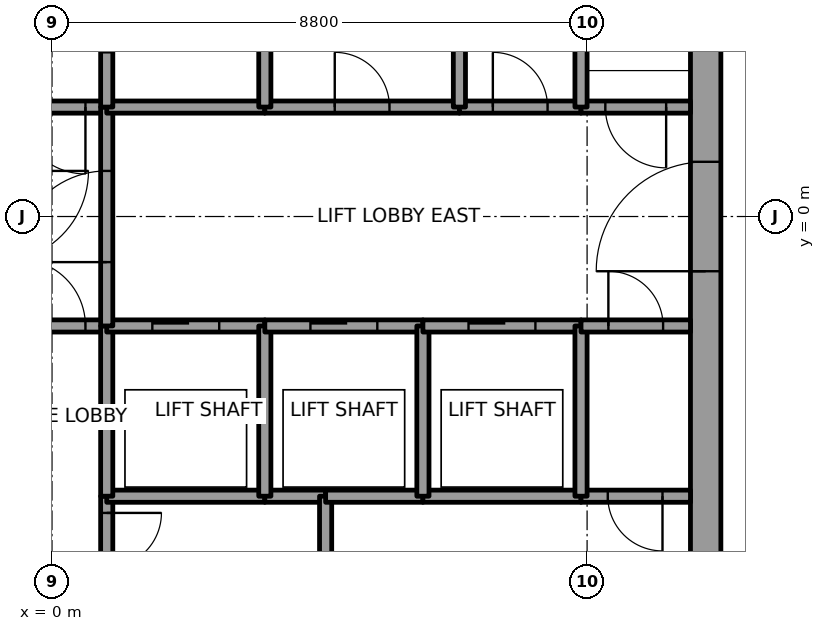
"""IFC4 building model, lengths in metres.
Left out: names, types, materials, properties, quantities, classifications, styles, units other than length and angle.
Written with IfcOpenShell. Run it as: python <this file> out.ifc"""

import sys

from ifc_helpers import new_model, si_unit, direction, frame, frame_2d, origin, place, context, subcontext, project, spatial, rectangle, extrude, element, fill, save


model = new_model("IFC4")
c1 = context("Model", 3, precision=1e-05, world=origin(), true_north=direction((0.0, 1.0)))
c2 = subcontext(c1, "Body", "Model", "MODEL_VIEW")
j1 = project(units=[si_unit("LENGTHUNIT", "METRE"), si_unit("PLANEANGLEUNIT", "RADIAN")], contexts=[c1])
p1 = place(None, origin())
s1 = spatial("IfcSite", under=j1, at=p1, CompositionType="ELEMENT")
p2 = place(p1, origin())
s2 = spatial("IfcBuilding", under=s1, at=p2, CompositionType="ELEMENT")
p3 = place(p2, frame((0.0, 0.0, 255.0)))
s3 = spatial("IfcBuildingStorey", under=s2, at=p3, CompositionType="ELEMENT", Elevation=255.0)
p4 = place(p3, frame((10.75, -7.5, 0.0), z_axis=(0.0, 0.0, 1.0), x_axis=(0.0, 1.0, 0.0)))
e1 = element("IfcWall", 1, at=p4, inside=s3, PredefinedType="SHEAR", context=c2, shape_type="SweptSolid", body=[
    extrude(rectangle(XDim=15.0, YDim=0.5, at=frame_2d((7.5, 0.0))), origin(), (0.0, 0.0, 1.0), 4.0),
])
p5 = place(p4, frame((6.6, 0.0, 0.0)))
e2 = element("IfcOpeningElement", 2, at=p5, cuts=e1, PredefinedType="OPENING", context=c2, shape_type="SweptSolid", body=[
    extrude(rectangle(XDim=1.8, YDim=2.1, at=frame_2d((0.9, 1.05))), frame((0.0, 0.25, 0.0), z_axis=(0.0, -1.0, 0.0), x_axis=(1.0, 0.0, 0.0)), (0.0, 0.0, 1.0), 0.5),
])
p6 = place(p3, frame((-0.9, -1.8, 0.0), z_axis=(0.0, 0.0, 1.0), x_axis=(1.0, 0.0, 0.0)))
e3 = element("IfcWall", 3, at=p6, inside=s3, PredefinedType="SOLIDWALL", context=c2, shape_type="SweptSolid", body=[
    extrude(rectangle(XDim=1.8, YDim=0.2, at=frame_2d((0.9, 0.0))), origin(), (0.0, 0.0, 1.0), 3.85),
])
p7 = place(p6, frame((0.35, 0.0, 0.0)))
e4 = element("IfcOpeningElement", 4, at=p7, cuts=e3, PredefinedType="OPENING", context=c2, shape_type="SweptSolid", body=[
    extrude(rectangle(XDim=1.1, YDim=2.1, at=frame_2d((0.55, 1.05))), frame((0.0, 0.1, 0.0), z_axis=(0.0, -1.0, 0.0), x_axis=(1.0, 0.0, 0.0)), (0.0, 0.0, 1.0), 0.2),
])
p8 = place(p3, frame((0.9, 1.8, 0.0), z_axis=(0.0, 0.0, 1.0), x_axis=(-1.0, 0.0, 0.0)))
e5 = element("IfcWall", 5, at=p8, inside=s3, PredefinedType="SOLIDWALL", context=c2, shape_type="SweptSolid", body=[
    extrude(rectangle(XDim=1.8, YDim=0.2, at=frame_2d((0.9, 0.0))), origin(), (0.0, 0.0, 1.0), 3.85),
])
p9 = place(p8, frame((0.35, 0.0, 0.0)))
e6 = element("IfcOpeningElement", 6, at=p9, cuts=e5, PredefinedType="OPENING", context=c2, shape_type="SweptSolid", body=[
    extrude(rectangle(XDim=1.1, YDim=2.1, at=frame_2d((0.55, 1.05))), frame((0.0, 0.1, 0.0), z_axis=(0.0, -1.0, 0.0), x_axis=(1.0, 0.0, 0.0)), (0.0, 0.0, 1.0), 0.2),
])
p10 = place(p3, frame((0.9, -4.6, 0.0), z_axis=(0.0, 0.0, 1.0), x_axis=(0.0, -1.0, 0.0)))
e7 = element("IfcWall", 7, at=p10, inside=s3, PredefinedType="SOLIDWALL", context=c2, shape_type="SweptSolid", body=[
    extrude(rectangle(XDim=1.45, YDim=0.2, at=frame_2d((0.725, 0.0))), origin(), (0.0, 0.0, 1.0), 3.85),
])
p11 = place(p10, frame((0.275, 0.0, 0.0)))
e8 = element("IfcOpeningElement", 8, at=p11, cuts=e7, PredefinedType="OPENING", context=c2, shape_type="SweptSolid", body=[
    extrude(rectangle(XDim=0.9, YDim=2.1, at=frame_2d((0.45, 1.05))), frame((0.0, 0.1, 0.0), z_axis=(0.0, -1.0, 0.0), x_axis=(1.0, 0.0, 0.0)), (0.0, 0.0, 1.0), 0.2),
])
p12 = place(p3, frame((3.5, -4.6, 0.0), z_axis=(0.0, 0.0, 1.0), x_axis=(-1.0, 0.0, 0.0)))
e9 = element("IfcWall", 9, at=p12, inside=s3, PredefinedType="SOLIDWALL", context=c2, shape_type="SweptSolid", body=[
    extrude(rectangle(XDim=2.6, YDim=0.2, at=frame_2d((1.3, 0.0))), origin(), (0.0, 0.0, 1.0), 3.85),
])
p13 = place(p3, frame((0.9, -1.8, 0.0), z_axis=(0.0, 0.0, 1.0), x_axis=(0.0, -1.0, 0.0)))
e10 = element("IfcWall", 10, at=p13, inside=s3, PredefinedType="SOLIDWALL", context=c2, shape_type="SweptSolid", body=[
    extrude(rectangle(XDim=2.8, YDim=0.2, at=frame_2d((1.4, 0.0))), origin(), (0.0, 0.0, 1.0), 3.85),
])
p14 = place(p3, frame((0.9, -1.8, 0.0), z_axis=(0.0, 0.0, 1.0), x_axis=(1.0, 0.0, 0.0)))
e11 = element("IfcWall", 11, at=p14, inside=s3, PredefinedType="SOLIDWALL", context=c2, shape_type="SweptSolid", body=[
    extrude(rectangle(XDim=2.6, YDim=0.2, at=frame_2d((1.3, 0.0))), origin(), (0.0, 0.0, 1.0), 3.85),
])
p15 = place(p14, frame((0.75, 0.0, 0.0)))
e12 = element("IfcOpeningElement", 12, at=p15, cuts=e11, PredefinedType="OPENING", context=c2, shape_type="SweptSolid", body=[
    extrude(rectangle(XDim=1.1, YDim=2.1, at=frame_2d((0.55, 1.05))), frame((0.0, 0.1, 0.0), z_axis=(0.0, -1.0, 0.0), x_axis=(1.0, 0.0, 0.0)), (0.0, 0.0, 1.0), 0.2),
])
p16 = place(p3, frame((0.9, -1.8, 0.0), z_axis=(0.0, 0.0, 1.0), x_axis=(0.0, 1.0, 0.0)))
e13 = element("IfcWall", 13, at=p16, inside=s3, PredefinedType="SOLIDWALL", context=c2, shape_type="SweptSolid", body=[
    extrude(rectangle(XDim=3.6, YDim=0.2, at=frame_2d((1.8, 0.0))), origin(), (0.0, 0.0, 1.0), 3.85),
])
p17 = place(p16, frame((1.05, 0.0, 0.0)))
e14 = element("IfcOpeningElement", 14, at=p17, cuts=e13, PredefinedType="OPENING", context=c2, shape_type="SweptSolid", body=[
    extrude(rectangle(XDim=1.5, YDim=2.1, at=frame_2d((0.75, 1.05))), frame((0.0, 0.1, 0.0), z_axis=(0.0, -1.0, 0.0), x_axis=(1.0, 0.0, 0.0)), (0.0, 0.0, 1.0), 0.2),
])
p18 = place(p3, frame((3.5, 1.8, 0.0), z_axis=(0.0, 0.0, 1.0), x_axis=(-1.0, 0.0, 0.0)))
e15 = element("IfcWall", 15, at=p18, inside=s3, PredefinedType="SOLIDWALL", context=c2, shape_type="SweptSolid", body=[
    extrude(rectangle(XDim=2.6, YDim=0.2, at=frame_2d((1.3, 0.0))), origin(), (0.0, 0.0, 1.0), 3.85),
])
p19 = place(p3, frame((0.9, 4.8, 0.0), z_axis=(0.0, 0.0, 1.0), x_axis=(0.0, -1.0, 0.0)))
e16 = element("IfcWall", 16, at=p19, inside=s3, PredefinedType="SOLIDWALL", context=c2, shape_type="SweptSolid", body=[
    extrude(rectangle(XDim=3.0, YDim=0.2, at=frame_2d((1.5, 0.0))), origin(), (0.0, 0.0, 1.0), 3.85),
])
p20 = place(p19, frame((0.9, 0.0, 0.0)))
e17 = element("IfcOpeningElement", 17, at=p20, cuts=e16, PredefinedType="OPENING", context=c2, shape_type="SweptSolid", body=[
    extrude(rectangle(XDim=1.2, YDim=2.1, at=frame_2d((0.6, 1.05))), frame((0.0, 0.1, 0.0), z_axis=(0.0, -1.0, 0.0), x_axis=(1.0, 0.0, 0.0)), (0.0, 0.0, 1.0), 0.2),
])
p21 = place(p3, frame((4.5, -4.6, 0.0), z_axis=(0.0, 0.0, 1.0), x_axis=(-1.0, 0.0, 0.0)))
e18 = element("IfcWall", 18, at=p21, inside=s3, PredefinedType="SOLIDWALL", context=c2, shape_type="SweptSolid", body=[
    extrude(rectangle(XDim=1.0, YDim=0.2, at=frame_2d((0.5, 0.0))), origin(), (0.0, 0.0, 1.0), 3.85),
])
p22 = place(p3, frame((3.5, -4.6, 0.0), z_axis=(0.0, 0.0, 1.0), x_axis=(0.0, 1.0, 0.0)))
e19 = element("IfcWall", 19, at=p22, inside=s3, PredefinedType="SOLIDWALL", context=c2, shape_type="SweptSolid", body=[
    extrude(rectangle(XDim=2.8, YDim=0.2, at=frame_2d((1.4, 0.0))), origin(), (0.0, 0.0, 1.0), 3.85),
])
p23 = place(p3, frame((3.5, -1.8, 0.0), z_axis=(0.0, 0.0, 1.0), x_axis=(1.0, 0.0, 0.0)))
e20 = element("IfcWall", 20, at=p23, inside=s3, PredefinedType="SOLIDWALL", context=c2, shape_type="SweptSolid", body=[
    extrude(rectangle(XDim=2.6, YDim=0.2, at=frame_2d((1.3, 0.0))), origin(), (0.0, 0.0, 1.0), 3.85),
])
p24 = place(p23, frame((0.75, 0.0, 0.0)))
e21 = element("IfcOpeningElement", 21, at=p24, cuts=e20, PredefinedType="OPENING", context=c2, shape_type="SweptSolid", body=[
    extrude(rectangle(XDim=1.1, YDim=2.1, at=frame_2d((0.55, 1.05))), frame((0.0, 0.1, 0.0), z_axis=(0.0, -1.0, 0.0), x_axis=(1.0, 0.0, 0.0)), (0.0, 0.0, 1.0), 0.2),
])
p25 = place(p3, frame((3.5, 1.8, 0.0), z_axis=(0.0, 0.0, 1.0), x_axis=(1.0, 0.0, 0.0)))
e22 = element("IfcWall", 22, at=p25, inside=s3, PredefinedType="SOLIDWALL", context=c2, shape_type="SweptSolid", body=[
    extrude(rectangle(XDim=3.2, YDim=0.2, at=frame_2d((1.6, 0.0))), origin(), (0.0, 0.0, 1.0), 3.85),
])
p26 = place(p25, frame((1.15, 0.0, 0.0)))
e23 = element("IfcOpeningElement", 23, at=p26, cuts=e22, PredefinedType="OPENING", context=c2, shape_type="SweptSolid", body=[
    extrude(rectangle(XDim=0.9, YDim=2.1, at=frame_2d((0.45, 1.05))), frame((0.0, 0.1, 0.0), z_axis=(0.0, -1.0, 0.0), x_axis=(1.0, 0.0, 0.0)), (0.0, 0.0, 1.0), 0.2),
])
p27 = place(p3, frame((3.5, 4.6, 0.0), z_axis=(0.0, 0.0, 1.0), x_axis=(0.0, -1.0, 0.0)))
e24 = element("IfcWall", 24, at=p27, inside=s3, PredefinedType="SOLIDWALL", context=c2, shape_type="SweptSolid", body=[
    extrude(rectangle(XDim=2.8, YDim=0.2, at=frame_2d((1.4, 0.0))), origin(), (0.0, 0.0, 1.0), 3.85),
])
p28 = place(p3, frame((4.5, -4.6, 0.0), z_axis=(0.0, 0.0, 1.0), x_axis=(0.0, -1.0, 0.0)))
e25 = element("IfcWall", 25, at=p28, inside=s3, PredefinedType="SOLIDWALL", context=c2, shape_type="SweptSolid", body=[
    extrude(rectangle(XDim=1.45, YDim=0.2, at=frame_2d((0.725, 0.0))), origin(), (0.0, 0.0, 1.0), 3.85),
])
p29 = place(p3, frame((6.1, -4.6, 0.0), z_axis=(0.0, 0.0, 1.0), x_axis=(-1.0, 0.0, 0.0)))
e26 = element("IfcWall", 26, at=p29, inside=s3, PredefinedType="SOLIDWALL", context=c2, shape_type="SweptSolid", body=[
    extrude(rectangle(XDim=1.6, YDim=0.2, at=frame_2d((0.8, 0.0))), origin(), (0.0, 0.0, 1.0), 3.85),
])
p30 = place(p3, frame((8.7, -4.6, 0.0), z_axis=(0.0, 0.0, 1.0), x_axis=(-1.0, 0.0, 0.0)))
e27 = element("IfcWall", 27, at=p30, inside=s3, PredefinedType="SOLIDWALL", context=c2, shape_type="SweptSolid", body=[
    extrude(rectangle(XDim=2.6, YDim=0.2, at=frame_2d((1.3, 0.0))), origin(), (0.0, 0.0, 1.0), 3.85),
])
p31 = place(p3, frame((6.1, -4.6, 0.0), z_axis=(0.0, 0.0, 1.0), x_axis=(0.0, 1.0, 0.0)))
e28 = element("IfcWall", 28, at=p31, inside=s3, PredefinedType="SOLIDWALL", context=c2, shape_type="SweptSolid", body=[
    extrude(rectangle(XDim=2.8, YDim=0.2, at=frame_2d((1.4, 0.0))), origin(), (0.0, 0.0, 1.0), 3.85),
])
p32 = place(p3, frame((6.1, -1.8, 0.0), z_axis=(0.0, 0.0, 1.0), x_axis=(1.0, 0.0, 0.0)))
e29 = element("IfcWall", 29, at=p32, inside=s3, PredefinedType="SOLIDWALL", context=c2, shape_type="SweptSolid", body=[
    extrude(rectangle(XDim=2.6, YDim=0.2, at=frame_2d((1.3, 0.0))), origin(), (0.0, 0.0, 1.0), 3.85),
])
p33 = place(p32, frame((0.75, 0.0, 0.0)))
e30 = element("IfcOpeningElement", 30, at=p33, cuts=e29, PredefinedType="OPENING", context=c2, shape_type="SweptSolid", body=[
    extrude(rectangle(XDim=1.1, YDim=2.1, at=frame_2d((0.55, 1.05))), frame((0.0, 0.1, 0.0), z_axis=(0.0, -1.0, 0.0), x_axis=(1.0, 0.0, 0.0)), (0.0, 0.0, 1.0), 0.2),
])
p34 = place(p3, frame((6.7, 1.8, 0.0), z_axis=(0.0, 0.0, 1.0), x_axis=(1.0, 0.0, 0.0)))
e31 = element("IfcWall", 31, at=p34, inside=s3, PredefinedType="SOLIDWALL", context=c2, shape_type="SweptSolid", body=[
    extrude(rectangle(XDim=2.0, YDim=0.2, at=frame_2d((1.0, 0.0))), origin(), (0.0, 0.0, 1.0), 3.85),
])
p35 = place(p34, frame((0.55, 0.0, 0.0)))
e32 = element("IfcOpeningElement", 32, at=p35, cuts=e31, PredefinedType="OPENING", context=c2, shape_type="SweptSolid", body=[
    extrude(rectangle(XDim=0.9, YDim=2.1, at=frame_2d((0.45, 1.05))), frame((0.0, 0.1, 0.0), z_axis=(0.0, -1.0, 0.0), x_axis=(1.0, 0.0, 0.0)), (0.0, 0.0, 1.0), 0.2),
])
p36 = place(p3, frame((6.7, 1.8, 0.0), z_axis=(0.0, 0.0, 1.0), x_axis=(0.0, 1.0, 0.0)))
e33 = element("IfcWall", 33, at=p36, inside=s3, PredefinedType="SOLIDWALL", context=c2, shape_type="SweptSolid", body=[
    extrude(rectangle(XDim=2.8, YDim=0.2, at=frame_2d((1.4, 0.0))), origin(), (0.0, 0.0, 1.0), 3.85),
])
p37 = place(p3, frame((10.5, -4.6, 0.0), z_axis=(0.0, 0.0, 1.0), x_axis=(-1.0, 0.0, 0.0)))
e34 = element("IfcWall", 34, at=p37, inside=s3, PredefinedType="SOLIDWALL", context=c2, shape_type="SweptSolid", body=[
    extrude(rectangle(XDim=1.8, YDim=0.2, at=frame_2d((0.9, 0.0))), origin(), (0.0, 0.0, 1.0), 3.85),
])
p38 = place(p37, frame((0.46, 0.0, 0.0)))
e35 = element("IfcOpeningElement", 35, at=p38, cuts=e34, PredefinedType="OPENING", context=c2, shape_type="SweptSolid", body=[
    extrude(rectangle(XDim=0.9, YDim=2.1, at=frame_2d((0.45, 1.05))), frame((0.0, 0.1, 0.0), z_axis=(0.0, -1.0, 0.0), x_axis=(1.0, 0.0, 0.0)), (0.0, 0.0, 1.0), 0.2),
])
p39 = place(p3, frame((8.7, -1.8, 0.0), z_axis=(0.0, 0.0, 1.0), x_axis=(0.0, -1.0, 0.0)))
e36 = element("IfcWall", 36, at=p39, inside=s3, PredefinedType="SOLIDWALL", context=c2, shape_type="SweptSolid", body=[
    extrude(rectangle(XDim=2.8, YDim=0.2, at=frame_2d((1.4, 0.0))), origin(), (0.0, 0.0, 1.0), 3.85),
])
p40 = place(p3, frame((8.7, -1.8, 0.0), z_axis=(0.0, 0.0, 1.0), x_axis=(1.0, 0.0, 0.0)))
e37 = element("IfcWall", 37, at=p40, inside=s3, PredefinedType="SOLIDWALL", context=c2, shape_type="SweptSolid", body=[
    extrude(rectangle(XDim=1.8, YDim=0.2, at=frame_2d((0.9, 0.0))), origin(), (0.0, 0.0, 1.0), 3.85),
])
p41 = place(p40, frame((0.45, 0.0, 0.0)))
e38 = element("IfcOpeningElement", 38, at=p41, cuts=e37, PredefinedType="OPENING", context=c2, shape_type="SweptSolid", body=[
    extrude(rectangle(XDim=0.9, YDim=2.1, at=frame_2d((0.45, 1.05))), frame((0.0, 0.1, 0.0), z_axis=(0.0, -1.0, 0.0), x_axis=(1.0, 0.0, 0.0)), (0.0, 0.0, 1.0), 0.2),
])
p42 = place(p3, frame((10.5, 1.8, 0.0), z_axis=(0.0, 0.0, 1.0), x_axis=(-1.0, 0.0, 0.0)))
e39 = element("IfcWall", 39, at=p42, inside=s3, PredefinedType="SOLIDWALL", context=c2, shape_type="SweptSolid", body=[
    extrude(rectangle(XDim=1.8, YDim=0.2, at=frame_2d((0.9, 0.0))), origin(), (0.0, 0.0, 1.0), 3.85),
])
p43 = place(p42, frame((0.4, 0.0, 0.0)))
e40 = element("IfcOpeningElement", 40, at=p43, cuts=e39, PredefinedType="OPENING", context=c2, shape_type="SweptSolid", body=[
    extrude(rectangle(XDim=1.0, YDim=2.1, at=frame_2d((0.5, 1.05))), frame((0.0, 0.1, 0.0), z_axis=(0.0, -1.0, 0.0), x_axis=(1.0, 0.0, 0.0)), (0.0, 0.0, 1.0), 0.2),
])
p44 = place(p3, frame((8.7, 1.8, 0.0), z_axis=(0.0, 0.0, 1.0), x_axis=(0.0, 1.0, 0.0)))
e41 = element("IfcWall", 41, at=p44, inside=s3, PredefinedType="SOLIDWALL", context=c2, shape_type="SweptSolid", body=[
    extrude(rectangle(XDim=2.8, YDim=0.2, at=frame_2d((1.4, 0.0))), origin(), (0.0, 0.0, 1.0), 3.85),
])
p45 = place(p15, origin())
e42 = element("IfcDoor", 42, at=p45, inside=s3, OperationType="SLIDING_TO_RIGHT", PredefinedType="DOOR", context=c2, shape_type="SweptSolid", body=[
    extrude(rectangle(XDim=1.1, YDim=2.1, at=frame_2d((0.55, 1.05))), frame((0.0, 0.025, 0.0), z_axis=(0.0, -1.0, 0.0), x_axis=(1.0, 0.0, 0.0)), (0.0, 0.0, 1.0), 0.05),
])
fill(e12, e42)
p46 = place(p24, origin())
e43 = element("IfcDoor", 43, at=p46, inside=s3, OperationType="SLIDING_TO_RIGHT", PredefinedType="DOOR", context=c2, shape_type="SweptSolid", body=[
    extrude(rectangle(XDim=1.1, YDim=2.1, at=frame_2d((0.55, 1.05))), frame((0.0, 0.025, 0.0), z_axis=(0.0, -1.0, 0.0), x_axis=(1.0, 0.0, 0.0)), (0.0, 0.0, 1.0), 0.05),
])
fill(e21, e43)
p47 = place(p33, origin())
e44 = element("IfcDoor", 44, at=p47, inside=s3, OperationType="SLIDING_TO_RIGHT", PredefinedType="DOOR", context=c2, shape_type="SweptSolid", body=[
    extrude(rectangle(XDim=1.1, YDim=2.1, at=frame_2d((0.55, 1.05))), frame((0.0, 0.025, 0.0), z_axis=(0.0, -1.0, 0.0), x_axis=(1.0, 0.0, 0.0)), (0.0, 0.0, 1.0), 0.05),
])
fill(e30, e44)
p48 = place(p17, origin())
e45 = element("IfcDoor", 45, at=p48, inside=s3, OperationType="DOUBLE_DOOR_SINGLE_SWING", PredefinedType="DOOR", context=c2, shape_type="SweptSolid", body=[
    extrude(rectangle(XDim=1.5, YDim=2.1, at=frame_2d((0.75, 1.05))), frame((0.0, 0.025, 0.0), z_axis=(0.0, -1.0, 0.0), x_axis=(1.0, 0.0, 0.0)), (0.0, 0.0, 1.0), 0.05),
])
fill(e14, e45)
p49 = place(p9, origin())
e46 = element("IfcDoor", 46, at=p49, inside=s3, OperationType="SINGLE_SWING_LEFT", PredefinedType="DOOR", context=c2, shape_type="SweptSolid", body=[
    extrude(rectangle(XDim=1.1, YDim=2.1, at=frame_2d((0.55, 1.05))), frame((0.0, 0.025, 0.0), z_axis=(0.0, -1.0, 0.0), x_axis=(1.0, 0.0, 0.0)), (0.0, 0.0, 1.0), 0.05),
])
fill(e6, e46)
p50 = place(p7, origin())
e47 = element("IfcDoor", 47, at=p50, inside=s3, OperationType="SINGLE_SWING_LEFT", PredefinedType="DOOR", context=c2, shape_type="SweptSolid", body=[
    extrude(rectangle(XDim=1.1, YDim=2.1, at=frame_2d((0.55, 1.05))), frame((0.0, 0.025, 0.0), z_axis=(0.0, -1.0, 0.0), x_axis=(1.0, 0.0, 0.0)), (0.0, 0.0, 1.0), 0.05),
])
fill(e4, e47)
p51 = place(p43, origin())
e48 = element("IfcDoor", 48, at=p51, inside=s3, OperationType="SINGLE_SWING_LEFT", PredefinedType="DOOR", context=c2, shape_type="SweptSolid", body=[
    extrude(rectangle(XDim=1.0, YDim=2.1, at=frame_2d((0.5, 1.05))), frame((0.0, 0.025, 0.0), z_axis=(0.0, -1.0, 0.0), x_axis=(1.0, 0.0, 0.0)), (0.0, 0.0, 1.0), 0.05),
])
fill(e40, e48)
p52 = place(p26, origin())
e49 = element("IfcDoor", 49, at=p52, inside=s3, OperationType="SINGLE_SWING_RIGHT", PredefinedType="DOOR", context=c2, shape_type="SweptSolid", body=[
    extrude(rectangle(XDim=0.9, YDim=2.1, at=frame_2d((0.45, 1.05))), frame((0.0, 0.025, 0.0), z_axis=(0.0, -1.0, 0.0), x_axis=(1.0, 0.0, 0.0)), (0.0, 0.0, 1.0), 0.05),
])
fill(e23, e49)
p53 = place(p35, origin())
e50 = element("IfcDoor", 50, at=p53, inside=s3, OperationType="SINGLE_SWING_RIGHT", PredefinedType="DOOR", context=c2, shape_type="SweptSolid", body=[
    extrude(rectangle(XDim=0.9, YDim=2.1, at=frame_2d((0.45, 1.05))), frame((0.0, 0.025, 0.0), z_axis=(0.0, -1.0, 0.0), x_axis=(1.0, 0.0, 0.0)), (0.0, 0.0, 1.0), 0.05),
])
fill(e32, e50)
p54 = place(p38, origin())
e51 = element("IfcDoor", 51, at=p54, inside=s3, OperationType="SINGLE_SWING_RIGHT", PredefinedType="DOOR", context=c2, shape_type="SweptSolid", body=[
    extrude(rectangle(XDim=0.9, YDim=2.1, at=frame_2d((0.45, 1.05))), frame((0.0, 0.025, 0.0), z_axis=(0.0, -1.0, 0.0), x_axis=(1.0, 0.0, 0.0)), (0.0, 0.0, 1.0), 0.05),
])
fill(e35, e51)
p55 = place(p41, origin())
e52 = element("IfcDoor", 52, at=p55, inside=s3, OperationType="SINGLE_SWING_LEFT", PredefinedType="DOOR", context=c2, shape_type="SweptSolid", body=[
    extrude(rectangle(XDim=0.9, YDim=2.1, at=frame_2d((0.45, 1.05))), frame((0.0, 0.025, 0.0), z_axis=(0.0, -1.0, 0.0), x_axis=(1.0, 0.0, 0.0)), (0.0, 0.0, 1.0), 0.05),
])
fill(e38, e52)
p56 = place(p11, origin())
e53 = element("IfcDoor", 53, at=p56, inside=s3, OperationType="SINGLE_SWING_RIGHT", PredefinedType="DOOR", context=c2, shape_type="SweptSolid", body=[
    extrude(rectangle(XDim=0.9, YDim=2.1, at=frame_2d((0.45, 1.05))), frame((0.0, 0.025, 0.0), z_axis=(0.0, -1.0, 0.0), x_axis=(1.0, 0.0, 0.0)), (0.0, 0.0, 1.0), 0.05),
])
fill(e8, e53)
p57 = place(p5, origin())
e54 = element("IfcDoor", 54, at=p57, inside=s3, OperationType="DOUBLE_DOOR_SINGLE_SWING", PredefinedType="DOOR", context=c2, shape_type="SweptSolid", body=[
    extrude(rectangle(XDim=1.8, YDim=2.1, at=frame_2d((0.9, 1.05))), frame((0.0, 0.025, 0.0), z_axis=(0.0, -1.0, 0.0), x_axis=(1.0, 0.0, 0.0)), (0.0, 0.0, 1.0), 0.05),
])
fill(e2, e54)
save(model, sys.argv[1])
